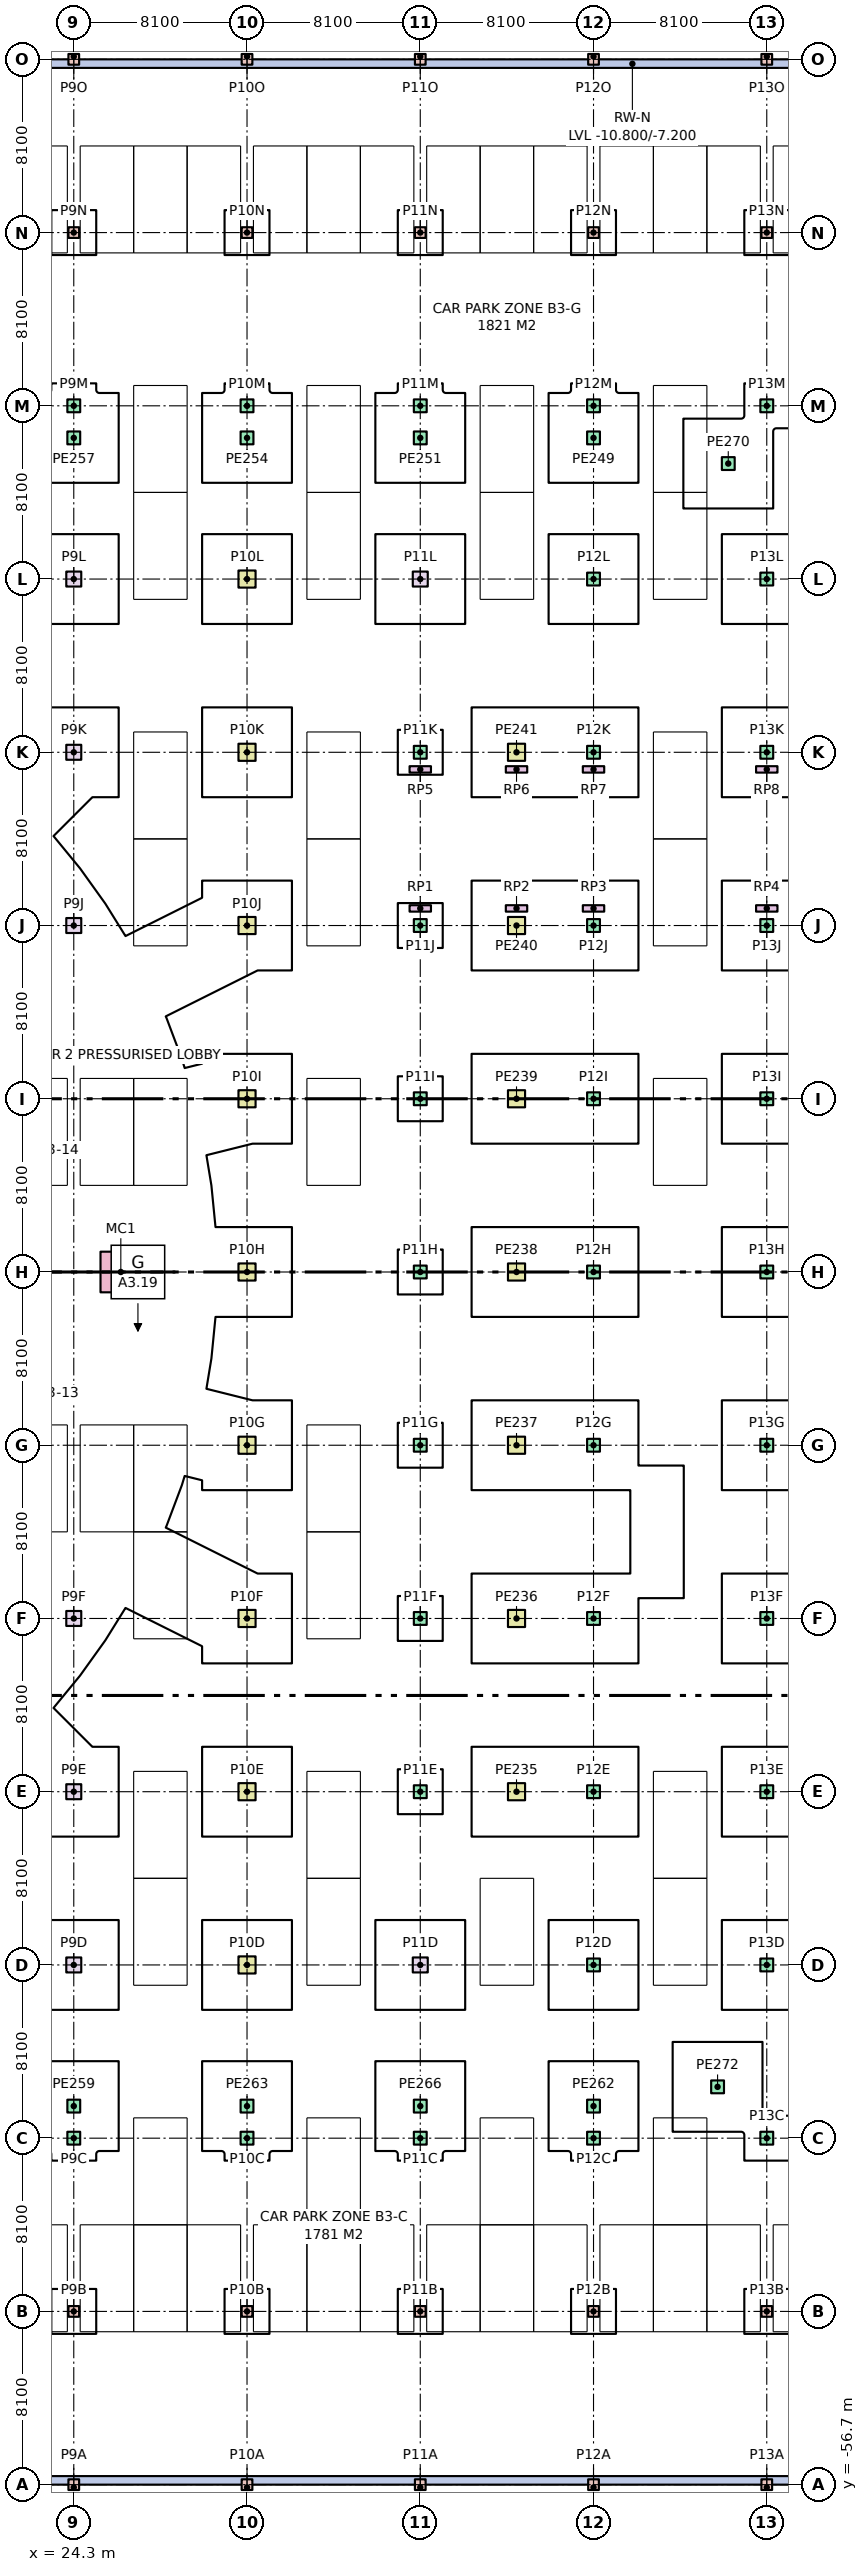
"""IFC4 building model, lengths in metres.
Left out: names, types, materials, properties, quantities, classifications, styles, units other than length and angle.
Written with IfcOpenShell. Run it as: python <this file> out.ifc"""

import sys

from ifc_helpers import new_model, si_unit, direction, frame, frame_2d, origin, origin_2d, place, context, subcontext, project, spatial, rectangle, extrude, element, save


model = new_model("IFC4")
c1 = context("Model", 3, precision=1e-05, world=origin(), true_north=direction((0.0, 1.0)))
c2 = subcontext(c1, "Body", "Model", "MODEL_VIEW")
j1 = project(units=[si_unit("LENGTHUNIT", "METRE"), si_unit("PLANEANGLEUNIT", "RADIAN")], contexts=[c1])
p1 = place(None, origin())
s1 = spatial("IfcSite", under=j1, at=p1, CompositionType="ELEMENT")
p2 = place(p1, origin())
s2 = spatial("IfcBuilding", under=s1, at=p2, CompositionType="ELEMENT")
p3 = place(p2, frame((0.0, 0.0, -10.8)))
s3 = spatial("IfcBuildingStorey", under=s2, at=p3, CompositionType="ELEMENT", Elevation=-10.8)
for number, where, z_axis, x_axis in (
    (1, (-40.5, 56.5, 0.0), (0.0, 0.0, 1.0), (1.0, 0.0, 0.0)),
    (2, (-40.5, -56.5, 0.0), (0.0, 0.0, 1.0), (1.0, 0.0, 0.0)),
):
    element("IfcWall", number, at=place(p3, frame(where, z_axis=z_axis, x_axis=x_axis)), inside=s3, PredefinedType="SOLIDWALL", context=c2, shape_type="SweptSolid", body=[
        extrude(rectangle(XDim=129.6, YDim=0.4, at=frame_2d((64.8, 0.0))), origin(), (0.0, 0.0, 1.0), 3.6),
    ])
for number, where, z_axis, x_axis in (
    (3, (24.3, -56.7, 0.0), (0.0, 0.0, 1.0), (1.0, 0.0, 0.0)),
    (4, (24.3, -48.6, 0.0), (0.0, 0.0, 1.0), (1.0, 0.0, 0.0)),
):
    element("IfcColumn", number, at=place(p3, frame(where, z_axis=z_axis, x_axis=x_axis)), inside=s3, PredefinedType="COLUMN", context=c2, shape_type="SweptSolid", body=[
        extrude(rectangle(XDim=0.5, YDim=0.5, at=origin_2d()), origin(), (0.0, 0.0, 1.0), 3.6),
    ])
p4 = place(p3, frame((24.3, -40.5, 0.0), z_axis=(0.0, 0.0, 1.0), x_axis=(1.0, 0.0, 0.0)))
e5 = element("IfcColumn", 5, at=p4, inside=s3, PredefinedType="COLUMN", context=c2, shape_type="SweptSolid", body=[
    extrude(rectangle(XDim=0.6, YDim=0.6, at=origin_2d()), origin(), (0.0, 0.0, 1.0), 3.6),
])
for number, where, z_axis, x_axis in (
    (6, (24.3, -32.4, 0.0), (0.0, 0.0, 1.0), (1.0, 0.0, 0.0)),
    (7, (24.3, -24.3, 0.0), (0.0, 0.0, 1.0), (1.0, 0.0, 0.0)),
    (8, (24.3, -16.2, 0.0), (0.0, 0.0, 1.0), (1.0, 0.0, 0.0)),
    (9, (24.3, 16.2, 0.0), (0.0, 0.0, 1.0), (1.0, 0.0, 0.0)),
    (10, (24.3, 24.3, 0.0), (0.0, 0.0, 1.0), (1.0, 0.0, 0.0)),
    (11, (24.3, 32.4, 0.0), (0.0, 0.0, 1.0), (1.0, 0.0, 0.0)),
):
    element("IfcColumn", number, at=place(p3, frame(where, z_axis=z_axis, x_axis=x_axis)), inside=s3, PredefinedType="COLUMN", context=c2, shape_type="SweptSolid", body=[
        extrude(rectangle(XDim=0.7, YDim=0.7, at=origin_2d()), origin(), (0.0, 0.0, 1.0), 3.6),
    ])
p5 = place(p3, frame((24.3, 40.5, 0.0), z_axis=(0.0, 0.0, 1.0), x_axis=(1.0, 0.0, 0.0)))
e12 = element("IfcColumn", 12, at=p5, inside=s3, PredefinedType="COLUMN", context=c2, shape_type="SweptSolid", body=[
    extrude(rectangle(XDim=0.6, YDim=0.6, at=origin_2d()), origin(), (0.0, 0.0, 1.0), 3.6),
])
for number, where, z_axis, x_axis in (
    (13, (24.3, 48.6, 0.0), (0.0, 0.0, 1.0), (1.0, 0.0, 0.0)),
    (14, (24.3, 56.7, 0.0), (0.0, 0.0, 1.0), (1.0, 0.0, 0.0)),
    (15, (32.4, -56.7, 0.0), (0.0, 0.0, 1.0), (1.0, 0.0, 0.0)),
    (16, (32.4, -48.6, 0.0), (0.0, 0.0, 1.0), (1.0, 0.0, 0.0)),
):
    element("IfcColumn", number, at=place(p3, frame(where, z_axis=z_axis, x_axis=x_axis)), inside=s3, PredefinedType="COLUMN", context=c2, shape_type="SweptSolid", body=[
        extrude(rectangle(XDim=0.5, YDim=0.5, at=origin_2d()), origin(), (0.0, 0.0, 1.0), 3.6),
    ])
p6 = place(p3, frame((32.4, -40.5, 0.0), z_axis=(0.0, 0.0, 1.0), x_axis=(1.0, 0.0, 0.0)))
e17 = element("IfcColumn", 17, at=p6, inside=s3, PredefinedType="COLUMN", context=c2, shape_type="SweptSolid", body=[
    extrude(rectangle(XDim=0.6, YDim=0.6, at=origin_2d()), origin(), (0.0, 0.0, 1.0), 3.6),
])
for number, where, z_axis, x_axis in (
    (18, (32.4, -32.4, 0.0), (0.0, 0.0, 1.0), (1.0, 0.0, 0.0)),
    (19, (32.4, -24.3, 0.0), (0.0, 0.0, 1.0), (1.0, 0.0, 0.0)),
    (20, (32.4, -16.2, 0.0), (0.0, 0.0, 1.0), (1.0, 0.0, 0.0)),
    (21, (32.4, -8.1, 0.0), (0.0, 0.0, 1.0), (1.0, 0.0, 0.0)),
    (22, (32.4, 0.0, 0.0), (0.0, 0.0, 1.0), (1.0, 0.0, 0.0)),
    (23, (32.4, 8.1, 0.0), (0.0, 0.0, 1.0), (1.0, 0.0, 0.0)),
    (24, (32.4, 16.2, 0.0), (0.0, 0.0, 1.0), (1.0, 0.0, 0.0)),
    (25, (32.4, 24.3, 0.0), (0.0, 0.0, 1.0), (1.0, 0.0, 0.0)),
    (26, (32.4, 32.4, 0.0), (0.0, 0.0, 1.0), (1.0, 0.0, 0.0)),
):
    element("IfcColumn", number, at=place(p3, frame(where, z_axis=z_axis, x_axis=x_axis)), inside=s3, PredefinedType="COLUMN", context=c2, shape_type="SweptSolid", body=[
        extrude(rectangle(XDim=0.8, YDim=0.8, at=origin_2d()), origin(), (0.0, 0.0, 1.0), 3.6),
    ])
p7 = place(p3, frame((32.4, 40.5, 0.0), z_axis=(0.0, 0.0, 1.0), x_axis=(1.0, 0.0, 0.0)))
e27 = element("IfcColumn", 27, at=p7, inside=s3, PredefinedType="COLUMN", context=c2, shape_type="SweptSolid", body=[
    extrude(rectangle(XDim=0.6, YDim=0.6, at=origin_2d()), origin(), (0.0, 0.0, 1.0), 3.6),
])
for number, where, z_axis, x_axis in (
    (28, (32.4, 48.6, 0.0), (0.0, 0.0, 1.0), (1.0, 0.0, 0.0)),
    (29, (32.4, 56.7, 0.0), (0.0, 0.0, 1.0), (1.0, 0.0, 0.0)),
    (30, (40.5, -56.7, 0.0), (0.0, 0.0, 1.0), (1.0, 0.0, 0.0)),
    (31, (40.5, -48.6, 0.0), (0.0, 0.0, 1.0), (1.0, 0.0, 0.0)),
):
    element("IfcColumn", number, at=place(p3, frame(where, z_axis=z_axis, x_axis=x_axis)), inside=s3, PredefinedType="COLUMN", context=c2, shape_type="SweptSolid", body=[
        extrude(rectangle(XDim=0.5, YDim=0.5, at=origin_2d()), origin(), (0.0, 0.0, 1.0), 3.6),
    ])
p8 = place(p3, frame((40.5, -40.5, 0.0), z_axis=(0.0, 0.0, 1.0), x_axis=(1.0, 0.0, 0.0)))
e32 = element("IfcColumn", 32, at=p8, inside=s3, PredefinedType="COLUMN", context=c2, shape_type="SweptSolid", body=[
    extrude(rectangle(XDim=0.6, YDim=0.6, at=origin_2d()), origin(), (0.0, 0.0, 1.0), 3.6),
])
p9 = place(p3, frame((40.5, -32.4, 0.0), z_axis=(0.0, 0.0, 1.0), x_axis=(1.0, 0.0, 0.0)))
e33 = element("IfcColumn", 33, at=p9, inside=s3, PredefinedType="COLUMN", context=c2, shape_type="SweptSolid", body=[
    extrude(rectangle(XDim=0.7, YDim=0.7, at=origin_2d()), origin(), (0.0, 0.0, 1.0), 3.6),
])
for number, where, z_axis, x_axis in (
    (34, (40.5, -24.3, 0.0), (0.0, 0.0, 1.0), (1.0, 0.0, 0.0)),
    (35, (40.5, -16.2, 0.0), (0.0, 0.0, 1.0), (1.0, 0.0, 0.0)),
    (36, (40.5, -8.1, 0.0), (0.0, 0.0, 1.0), (1.0, 0.0, 0.0)),
    (37, (40.5, 0.0, 0.0), (0.0, 0.0, 1.0), (1.0, 0.0, 0.0)),
    (38, (40.5, 8.1, 0.0), (0.0, 0.0, 1.0), (1.0, 0.0, 0.0)),
    (39, (40.5, 16.2, 0.0), (0.0, 0.0, 1.0), (1.0, 0.0, 0.0)),
    (40, (40.5, 24.3, 0.0), (0.0, 0.0, 1.0), (1.0, 0.0, 0.0)),
):
    element("IfcColumn", number, at=place(p3, frame(where, z_axis=z_axis, x_axis=x_axis)), inside=s3, PredefinedType="COLUMN", context=c2, shape_type="SweptSolid", body=[
        extrude(rectangle(XDim=0.6, YDim=0.6, at=origin_2d()), origin(), (0.0, 0.0, 1.0), 3.6),
    ])
p10 = place(p3, frame((40.5, 32.4, 0.0), z_axis=(0.0, 0.0, 1.0), x_axis=(1.0, 0.0, 0.0)))
e41 = element("IfcColumn", 41, at=p10, inside=s3, PredefinedType="COLUMN", context=c2, shape_type="SweptSolid", body=[
    extrude(rectangle(XDim=0.7, YDim=0.7, at=origin_2d()), origin(), (0.0, 0.0, 1.0), 3.6),
])
p11 = place(p3, frame((40.5, 40.5, 0.0), z_axis=(0.0, 0.0, 1.0), x_axis=(1.0, 0.0, 0.0)))
e42 = element("IfcColumn", 42, at=p11, inside=s3, PredefinedType="COLUMN", context=c2, shape_type="SweptSolid", body=[
    extrude(rectangle(XDim=0.6, YDim=0.6, at=origin_2d()), origin(), (0.0, 0.0, 1.0), 3.6),
])
for number, where, z_axis, x_axis in (
    (43, (40.5, 48.6, 0.0), (0.0, 0.0, 1.0), (1.0, 0.0, 0.0)),
    (44, (40.5, 56.7, 0.0), (0.0, 0.0, 1.0), (1.0, 0.0, 0.0)),
    (45, (48.6, -56.7, 0.0), (0.0, 0.0, 1.0), (1.0, 0.0, 0.0)),
    (46, (48.6, -48.6, 0.0), (0.0, 0.0, 1.0), (1.0, 0.0, 0.0)),
):
    element("IfcColumn", number, at=place(p3, frame(where, z_axis=z_axis, x_axis=x_axis)), inside=s3, PredefinedType="COLUMN", context=c2, shape_type="SweptSolid", body=[
        extrude(rectangle(XDim=0.5, YDim=0.5, at=origin_2d()), origin(), (0.0, 0.0, 1.0), 3.6),
    ])
for number, where, z_axis, x_axis in (
    (47, (48.6, -40.5, 0.0), (0.0, 0.0, 1.0), (1.0, 0.0, 0.0)),
    (48, (48.6, -32.4, 0.0), (0.0, 0.0, 1.0), (1.0, 0.0, 0.0)),
    (49, (48.6, -24.3, 0.0), (0.0, 0.0, 1.0), (1.0, 0.0, 0.0)),
    (50, (48.6, -16.2, 0.0), (0.0, 0.0, 1.0), (1.0, 0.0, 0.0)),
    (51, (48.6, -8.1, 0.0), (0.0, 0.0, 1.0), (1.0, 0.0, 0.0)),
    (52, (48.6, 0.0, 0.0), (0.0, 0.0, 1.0), (1.0, 0.0, 0.0)),
    (53, (48.6, 8.1, 0.0), (0.0, 0.0, 1.0), (1.0, 0.0, 0.0)),
    (54, (48.6, 16.2, 0.0), (0.0, 0.0, 1.0), (1.0, 0.0, 0.0)),
    (55, (48.6, 24.3, 0.0), (0.0, 0.0, 1.0), (1.0, 0.0, 0.0)),
    (56, (48.6, 32.4, 0.0), (0.0, 0.0, 1.0), (1.0, 0.0, 0.0)),
    (57, (48.6, 40.5, 0.0), (0.0, 0.0, 1.0), (1.0, 0.0, 0.0)),
):
    element("IfcColumn", number, at=place(p3, frame(where, z_axis=z_axis, x_axis=x_axis)), inside=s3, PredefinedType="COLUMN", context=c2, shape_type="SweptSolid", body=[
        extrude(rectangle(XDim=0.6, YDim=0.6, at=origin_2d()), origin(), (0.0, 0.0, 1.0), 3.6),
    ])
for number, where, z_axis, x_axis in (
    (58, (48.6, 48.6, 0.0), (0.0, 0.0, 1.0), (1.0, 0.0, 0.0)),
    (59, (48.6, 56.7, 0.0), (0.0, 0.0, 1.0), (1.0, 0.0, 0.0)),
    (60, (56.7, -56.7, 0.0), (0.0, 0.0, 1.0), (1.0, 0.0, 0.0)),
    (61, (56.7, -48.6, 0.0), (0.0, 0.0, 1.0), (1.0, 0.0, 0.0)),
):
    element("IfcColumn", number, at=place(p3, frame(where, z_axis=z_axis, x_axis=x_axis)), inside=s3, PredefinedType="COLUMN", context=c2, shape_type="SweptSolid", body=[
        extrude(rectangle(XDim=0.5, YDim=0.5, at=origin_2d()), origin(), (0.0, 0.0, 1.0), 3.6),
    ])
for number, where, z_axis, x_axis in (
    (62, (56.7, -40.5, 0.0), (0.0, 0.0, 1.0), (1.0, 0.0, 0.0)),
    (63, (56.7, -32.4, 0.0), (0.0, 0.0, 1.0), (1.0, 0.0, 0.0)),
    (64, (56.7, -24.3, 0.0), (0.0, 0.0, 1.0), (1.0, 0.0, 0.0)),
    (65, (56.7, -16.2, 0.0), (0.0, 0.0, 1.0), (1.0, 0.0, 0.0)),
    (66, (56.7, -8.1, 0.0), (0.0, 0.0, 1.0), (1.0, 0.0, 0.0)),
    (67, (56.7, 0.0, 0.0), (0.0, 0.0, 1.0), (1.0, 0.0, 0.0)),
    (68, (56.7, 8.1, 0.0), (0.0, 0.0, 1.0), (1.0, 0.0, 0.0)),
    (69, (56.7, 16.2, 0.0), (0.0, 0.0, 1.0), (1.0, 0.0, 0.0)),
    (70, (56.7, 24.3, 0.0), (0.0, 0.0, 1.0), (1.0, 0.0, 0.0)),
    (71, (56.7, 32.4, 0.0), (0.0, 0.0, 1.0), (1.0, 0.0, 0.0)),
    (72, (56.7, 40.5, 0.0), (0.0, 0.0, 1.0), (1.0, 0.0, 0.0)),
):
    element("IfcColumn", number, at=place(p3, frame(where, z_axis=z_axis, x_axis=x_axis)), inside=s3, PredefinedType="COLUMN", context=c2, shape_type="SweptSolid", body=[
        extrude(rectangle(XDim=0.6, YDim=0.6, at=origin_2d()), origin(), (0.0, 0.0, 1.0), 3.6),
    ])
for number, where, z_axis, x_axis in (
    (73, (56.7, 48.6, 0.0), (0.0, 0.0, 1.0), (1.0, 0.0, 0.0)),
    (74, (56.7, 56.7, 0.0), (0.0, 0.0, 1.0), (1.0, 0.0, 0.0)),
):
    element("IfcColumn", number, at=place(p3, frame(where, z_axis=z_axis, x_axis=x_axis)), inside=s3, PredefinedType="COLUMN", context=c2, shape_type="SweptSolid", body=[
        extrude(rectangle(XDim=0.5, YDim=0.5, at=origin_2d()), origin(), (0.0, 0.0, 1.0), 3.6),
    ])
for number, where, z_axis, x_axis in (
    (75, (45.0, -24.3, 0.0), (0.0, 0.0, 1.0), (1.0, 0.0, 0.0)),
    (76, (45.0, -16.2, 0.0), (0.0, 0.0, 1.0), (1.0, 0.0, 0.0)),
    (77, (45.0, -8.1, 0.0), (0.0, 0.0, 1.0), (1.0, 0.0, 0.0)),
    (78, (45.0, 0.0, 0.0), (0.0, 0.0, 1.0), (1.0, 0.0, 0.0)),
    (79, (45.0, 8.1, 0.0), (0.0, 0.0, 1.0), (1.0, 0.0, 0.0)),
    (80, (45.0, 16.2, 0.0), (0.0, 0.0, 1.0), (1.0, 0.0, 0.0)),
    (81, (45.0, 24.3, 0.0), (0.0, 0.0, 1.0), (1.0, 0.0, 0.0)),
):
    element("IfcColumn", number, at=place(p3, frame(where, z_axis=z_axis, x_axis=x_axis)), inside=s3, PredefinedType="COLUMN", context=c2, shape_type="SweptSolid", body=[
        extrude(rectangle(XDim=0.8, YDim=0.8, at=origin_2d()), origin(), (0.0, 0.0, 1.0), 3.6),
    ])
for number, where, z_axis, x_axis in (
    (82, (48.6, 39.0, 0.0), (0.0, 0.0, 1.0), (1.0, 0.0, 0.0)),
    (83, (40.5, 39.0, 0.0), (0.0, 0.0, 1.0), (1.0, 0.0, 0.0)),
    (84, (32.4, 39.0, 0.0), (0.0, 0.0, 1.0), (1.0, 0.0, 0.0)),
    (85, (24.3, 39.0, 0.0), (0.0, 0.0, 1.0), (1.0, 0.0, 0.0)),
    (86, (24.3, -39.0, 0.0), (0.0, 0.0, 1.0), (1.0, 0.0, 0.0)),
    (87, (48.6, -39.0, 0.0), (0.0, 0.0, 1.0), (1.0, 0.0, 0.0)),
    (88, (32.4, -39.0, 0.0), (0.0, 0.0, 1.0), (1.0, 0.0, 0.0)),
    (89, (40.5, -39.0, 0.0), (0.0, 0.0, 1.0), (1.0, 0.0, 0.0)),
    (90, (54.9, 37.8, 0.0), (0.0, 0.0, 1.0), (1.0, 0.0, 0.0)),
    (91, (54.4, -38.1, 0.0), (0.0, 0.0, 1.0), (1.0, 0.0, 0.0)),
):
    element("IfcColumn", number, at=place(p3, frame(where, z_axis=z_axis, x_axis=x_axis)), inside=s3, PredefinedType="COLUMN", context=c2, shape_type="SweptSolid", body=[
        extrude(rectangle(XDim=0.6, YDim=0.6, at=origin_2d()), origin(), (0.0, 0.0, 1.0), 3.6),
    ])
p12 = place(p3, frame((26.5, 0.0, 0.0), z_axis=(0.0, 0.0, 1.0), x_axis=(0.0, 1.0, 0.0)))
e92 = element("IfcColumn", 92, at=p12, inside=s3, PredefinedType="COLUMN", context=c2, shape_type="SweptSolid", body=[
    extrude(rectangle(XDim=1.9, YDim=1.9, at=origin_2d()), origin(), (0.0, 0.0, 1.0), 3.6),
])
for number, where, z_axis, x_axis in (
    (93, (40.5, 17.0, 0.0), (0.0, 0.0, 1.0), (1.0, 0.0, 0.0)),
    (94, (45.0, 17.0, 0.0), (0.0, 0.0, 1.0), (1.0, 0.0, 0.0)),
    (95, (48.6, 17.0, 0.0), (0.0, 0.0, 1.0), (1.0, 0.0, 0.0)),
    (96, (56.7, 17.0, 0.0), (0.0, 0.0, 1.0), (1.0, 0.0, 0.0)),
    (97, (40.5, 23.5, 0.0), (0.0, 0.0, 1.0), (1.0, 0.0, 0.0)),
    (98, (45.0, 23.5, 0.0), (0.0, 0.0, 1.0), (1.0, 0.0, 0.0)),
    (99, (48.6, 23.5, 0.0), (0.0, 0.0, 1.0), (1.0, 0.0, 0.0)),
    (100, (56.7, 23.5, 0.0), (0.0, 0.0, 1.0), (1.0, 0.0, 0.0)),
):
    element("IfcColumn", number, at=place(p3, frame(where, z_axis=z_axis, x_axis=x_axis)), inside=s3, PredefinedType="COLUMN", context=c2, shape_type="SweptSolid", body=[
        extrude(rectangle(XDim=1.0, YDim=0.3, at=origin_2d()), origin(), (0.0, 0.0, 1.0), 3.6),
    ])
save(model, sys.argv[1])
